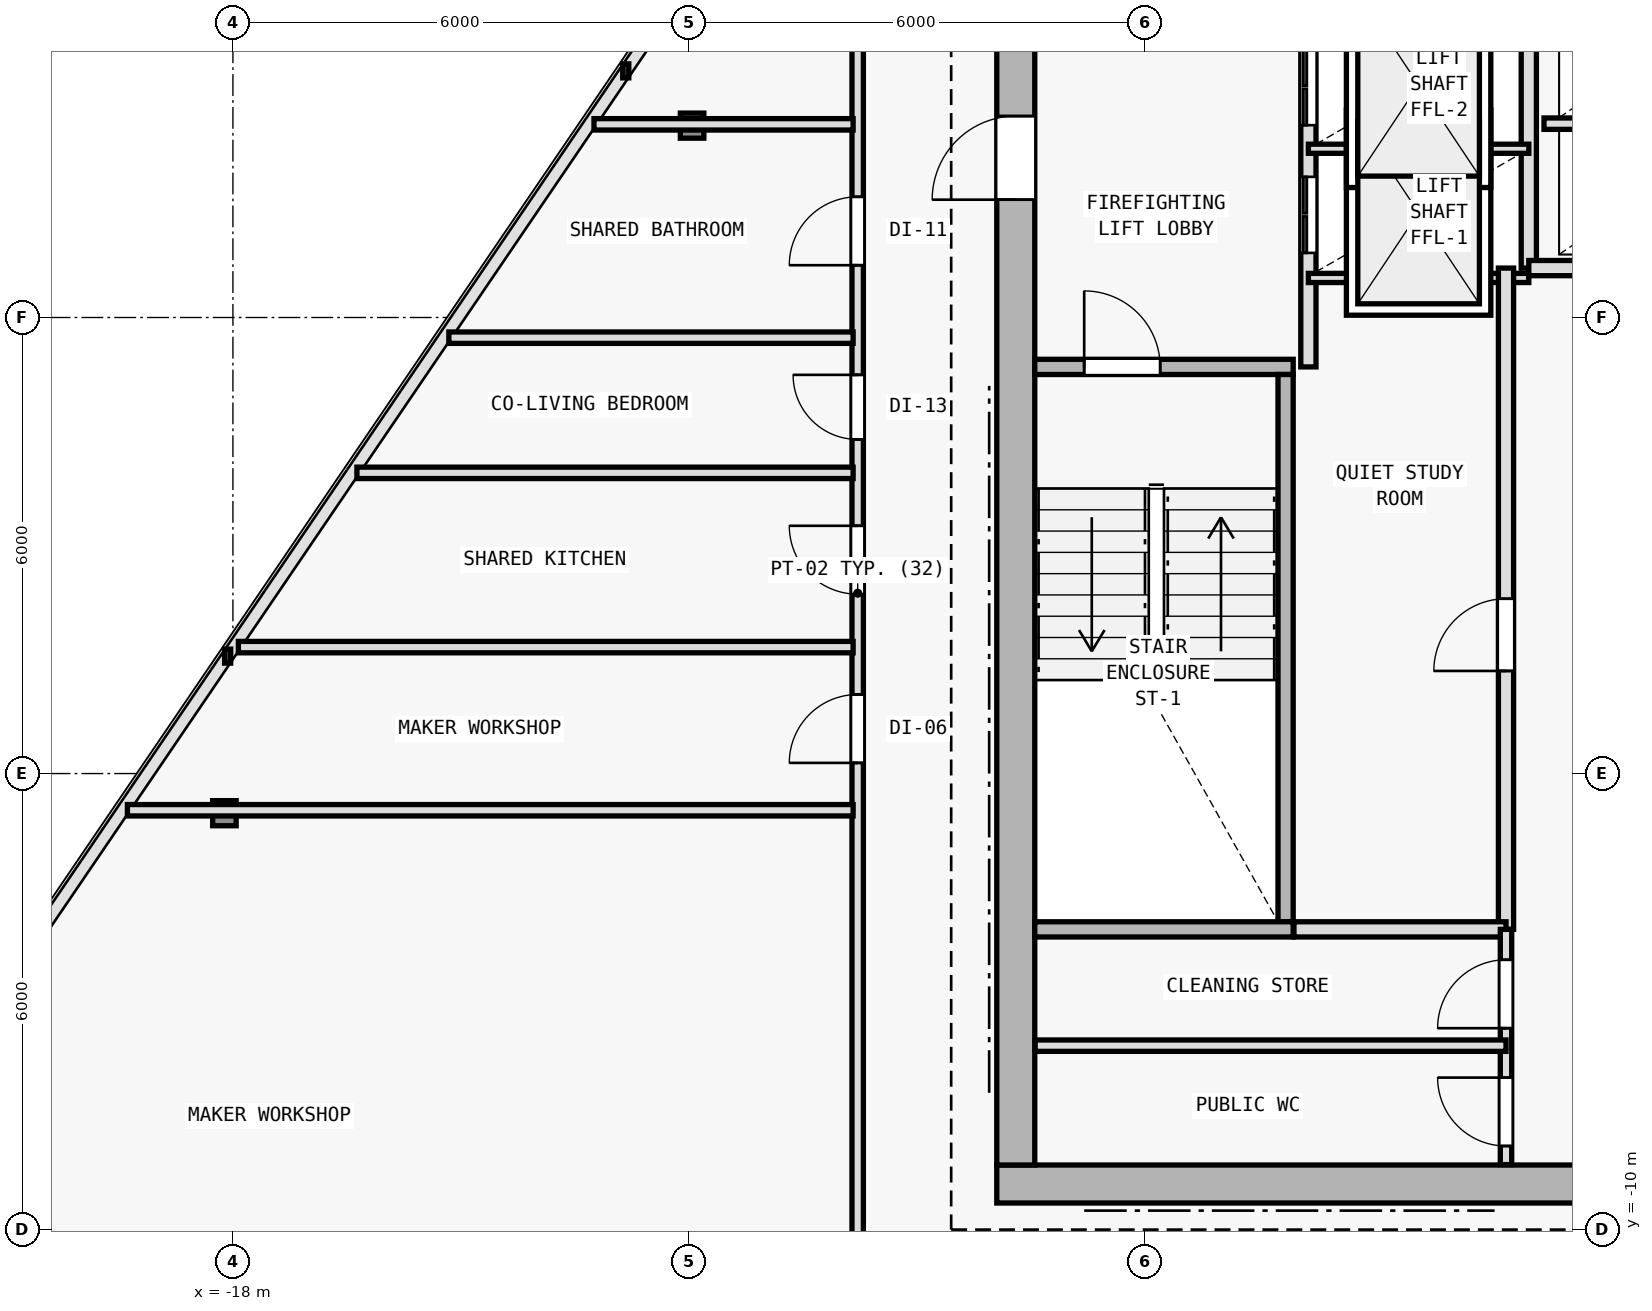
"""IFC4 building model, lengths in metres.
Left out: names, types, materials, properties, quantities, classifications, styles, units other than length and angle.
Written with IfcOpenShell. Run it as: python <this file> out.ifc"""

import sys

from ifc_helpers import new_model, si_unit, direction, frame, frame_2d, origin, origin_2d, place, context, subcontext, project, spatial, rectangle, i_section, extrude, element, fill, save


model = new_model("IFC4")
c1 = context("Model", 3, precision=1e-05, world=origin(), true_north=direction((0.0, 1.0)))
c2 = subcontext(c1, "Body", "Model", "MODEL_VIEW")
j1 = project(units=[si_unit("LENGTHUNIT", "METRE"), si_unit("PLANEANGLEUNIT", "RADIAN")], contexts=[c1])
p1 = place(None, origin())
s1 = spatial("IfcSite", under=j1, at=p1, CompositionType="ELEMENT")
p2 = place(p1, origin())
s2 = spatial("IfcBuilding", under=s1, at=p2, CompositionType="ELEMENT")
p3 = place(p2, frame((0.0, 0.0, 283.2)))
s3 = spatial("IfcBuildingStorey", under=s2, at=p3, CompositionType="ELEMENT", Elevation=283.2)
for number, where, z_axis, x_axis in (
    (1, (-7.7, -9.4, 0.0), (0.0, 0.0, 1.0), (1.0, 0.0, 0.0)),
    (2, (-7.7, 2.0, 0.0), (0.0, 0.0, 1.0), (1.0, 0.0, 0.0)),
):
    element("IfcColumn", number, at=place(p3, frame(where, z_axis=z_axis, x_axis=x_axis)), inside=s3, PredefinedType="COLUMN", context=c2, shape_type="SweptSolid", body=[
        extrude(i_section(OverallWidth=0.374, OverallDepth=0.372, WebThickness=0.012, FlangeThickness=0.02, FilletRadius=0.015, at=origin_2d()), origin(), (0.0, 0.0, 1.0), 3.6),
    ])
p4 = place(p3, frame((-11.958, 4.524, 0.006), z_axis=(0.017003561856, 0.009590008887, 0.99980943715), x_axis=(-0.491253415567, 0.871016694268, 0.0)))
e3 = element("IfcColumn", 3, at=p4, inside=s3, PredefinedType="COLUMN", context=c2, shape_type="SweptSolid", body=[
    extrude(i_section(OverallWidth=0.309, OverallDepth=0.33, WebThickness=0.011, FlangeThickness=0.019, FilletRadius=0.027, at=origin_2d()), origin(), (0.0, 0.0, 1.0), 3.59),
])
p5 = place(p3, frame((-18.112, -4.521, 0.006), z_axis=(0.025292146924, 0.021552716599, 0.999447741361), x_axis=(-0.648598186856, 0.761130995301, 0.0)))
e4 = element("IfcColumn", 4, at=p5, inside=s3, PredefinedType="COLUMN", context=c2, shape_type="SweptSolid", body=[
    extrude(i_section(OverallWidth=0.309, OverallDepth=0.33, WebThickness=0.011, FlangeThickness=0.019, FilletRadius=0.027, at=origin_2d()), origin(), (0.0, 0.0, 1.0), 3.591),
])
p6 = place(p3, frame((-7.95, -9.4, 0.0), z_axis=(0.0, 0.0, 1.0), x_axis=(1.0, 0.0, 0.0)))
e5 = element("IfcWall", 5, at=p6, inside=s3, PredefinedType="SHEAR", context=c2, shape_type="SweptSolid", body=[
    extrude(rectangle(XDim=15.9, YDim=0.5, at=frame_2d((7.95, 0.0))), origin(), (0.0, 0.0, 1.0), 3.35),
])
p7 = place(p6, frame((9.6, 0.0, 0.0)))
e6 = element("IfcOpeningElement", 6, at=p7, cuts=e5, PredefinedType="OPENING", context=c2, shape_type="SweptSolid", body=[
    extrude(rectangle(XDim=1.5, YDim=2.2, at=frame_2d((0.75, 1.1))), frame((0.0, 0.26, 0.0), z_axis=(0.0, -1.0, 0.0), x_axis=(1.0, 0.0, 0.0)), (0.0, 0.0, 1.0), 0.52),
])
p8 = place(p3, frame((-7.7, -9.15, 0.0), z_axis=(0.0, 0.0, 1.0), x_axis=(0.0, 1.0, 0.0)))
e7 = element("IfcWall", 7, at=p8, inside=s3, PredefinedType="SHEAR", context=c2, shape_type="SweptSolid", body=[
    extrude(rectangle(XDim=19.1, YDim=0.5, at=frame_2d((9.55, 0.0))), origin(), (0.0, 0.0, 1.0), 3.35),
])
p9 = place(p8, frame((12.7, 0.0, 0.0)))
e8 = element("IfcOpeningElement", 8, at=p9, cuts=e7, PredefinedType="OPENING", context=c2, shape_type="SweptSolid", body=[
    extrude(rectangle(XDim=1.1, YDim=2.15, at=frame_2d((0.55, 1.075))), frame((0.0, 0.26, 0.0), z_axis=(0.0, -1.0, 0.0), x_axis=(1.0, 0.0, 0.0)), (0.0, 0.0, 1.0), 0.52),
])
p10 = place(p3, frame((-7.45, 1.35, 0.0), z_axis=(0.0, 0.0, 1.0), x_axis=(1.0, 0.0, 0.0)))
e9 = element("IfcWall", 9, at=p10, inside=s3, PredefinedType="SOLIDWALL", context=c2, shape_type="SweptSolid", body=[
    extrude(rectangle(XDim=3.4, YDim=0.2, at=frame_2d((1.7, 0.0))), origin(), (0.0, 0.0, 1.0), 3.35),
])
p11 = place(p10, frame((0.65, 0.0, 0.0)))
e10 = element("IfcOpeningElement", 10, at=p11, cuts=e9, PredefinedType="OPENING", context=c2, shape_type="SweptSolid", body=[
    extrude(rectangle(XDim=1.0, YDim=2.15, at=frame_2d((0.5, 1.075))), frame((0.0, 0.11, 0.0), z_axis=(0.0, -1.0, 0.0), x_axis=(1.0, 0.0, 0.0)), (0.0, 0.0, 1.0), 0.22),
])
p12 = place(p3, frame((-4.15, -5.95, 0.0), z_axis=(0.0, 0.0, 1.0), x_axis=(0.0, 1.0, 0.0)))
e11 = element("IfcWall", 11, at=p12, inside=s3, PredefinedType="SOLIDWALL", context=c2, shape_type="SweptSolid", body=[
    extrude(rectangle(XDim=7.2, YDim=0.2, at=frame_2d((3.6, 0.0))), origin(), (0.0, 0.0, 1.0), 3.35),
])
p13 = place(p3, frame((-3.85, 1.35, 0.0), z_axis=(0.0, 0.0, 1.0), x_axis=(0.0, 1.0, 0.0)))
e12 = element("IfcWall", 12, at=p13, inside=s3, PredefinedType="SOLIDWALL", context=c2, shape_type="SweptSolid", body=[
    extrude(rectangle(XDim=8.595, YDim=0.2, at=frame_2d((4.297, 0.0))), origin(), (0.0, 0.0, 1.0), 3.35),
])
p14 = place(p13, frame((1.5, 0.0, 0.0)))
e13 = element("IfcOpeningElement", 13, at=p14, cuts=e12, PredefinedType="OPENING", context=c2, shape_type="SweptSolid", body=[
    extrude(rectangle(XDim=1.0, YDim=2.15, at=frame_2d((0.5, 1.075))), frame((0.0, 0.11, 0.0), z_axis=(0.0, -1.0, 0.0), x_axis=(1.0, 0.0, 0.0)), (0.0, 0.0, 1.0), 0.22),
])
p15 = place(p13, frame((3.18, 0.0, 0.0)))
e14 = element("IfcOpeningElement", 14, at=p15, cuts=e12, PredefinedType="OPENING", context=c2, shape_type="SweptSolid", body=[
    extrude(rectangle(XDim=1.0, YDim=2.15, at=frame_2d((0.5, 1.075))), frame((0.0, 0.11, 0.0), z_axis=(0.0, -1.0, 0.0), x_axis=(1.0, 0.0, 0.0)), (0.0, 0.0, 1.0), 0.22),
])
p16 = place(p3, frame((-0.95, 2.65, 0.0), z_axis=(0.0, 0.0, 1.0), x_axis=(0.0, 1.0, 0.0)))
e15 = element("IfcWall", 15, at=p16, inside=s3, PredefinedType="SOLIDWALL", context=c2, shape_type="SweptSolid", body=[
    extrude(rectangle(XDim=3.27, YDim=0.2, at=frame_2d((1.635, 0.0))), origin(), (0.0, 0.0, 1.0), 3.35),
])
for number, where, z_axis, x_axis in (
    (16, (-3.85, 2.52, 0.0), (0.0, 0.0, 1.0), (1.0, 0.0, 0.0)),
    (17, (-3.85, 4.22, 0.0), (0.0, 0.0, 1.0), (1.0, 0.0, 0.0)),
):
    element("IfcWall", number, at=place(p3, frame(where, z_axis=z_axis, x_axis=x_axis)), inside=s3, PredefinedType="PARTITIONING", context=c2, shape_type="SweptSolid", body=[
        extrude(rectangle(XDim=2.9, YDim=0.12, at=frame_2d((1.45, 0.0))), origin(), (0.0, 0.0, 1.0), 3.35),
    ])
p17 = place(p3, frame((-1.25, -6.05, 0.0), z_axis=(0.0, 0.0, 1.0), x_axis=(0.0, 1.0, 0.0)))
e18 = element("IfcWall", 18, at=p17, inside=s3, PredefinedType="SOLIDWALL", context=c2, shape_type="SweptSolid", body=[
    extrude(rectangle(XDim=8.7, YDim=0.2, at=frame_2d((4.35, 0.0))), origin(), (0.0, 0.0, 1.0), 3.35),
])
p18 = place(p17, frame((3.4, 0.0, 0.0)))
e19 = element("IfcOpeningElement", 19, at=p18, cuts=e18, PredefinedType="OPENING", context=c2, shape_type="SweptSolid", body=[
    extrude(rectangle(XDim=0.95, YDim=2.1, at=frame_2d((0.475, 1.05))), frame((0.0, 0.11, 0.0), z_axis=(0.0, -1.0, 0.0), x_axis=(1.0, 0.0, 0.0)), (0.0, 0.0, 1.0), 0.22),
])
p19 = place(p3, frame((-0.95, 2.65, 0.0), z_axis=(0.0, 0.0, 1.0), x_axis=(1.0, 0.0, 0.0)))
e20 = element("IfcWall", 20, at=p19, inside=s3, PredefinedType="SOLIDWALL", context=c2, shape_type="SweptSolid", body=[
    extrude(rectangle(XDim=2.9, YDim=0.2, at=frame_2d((1.45, 0.0))), origin(), (0.0, 0.0, 1.0), 3.35),
])
p20 = place(p3, frame((-0.75, 4.55, 0.0), z_axis=(0.0, 0.0, 1.0), x_axis=(1.0, 0.0, 0.0)))
e21 = element("IfcWall", 21, at=p20, inside=s3, PredefinedType="PARTITIONING", context=c2, shape_type="SweptSolid", body=[
    extrude(rectangle(XDim=2.7, YDim=0.15, at=frame_2d((1.35, 0.0))), origin(), (0.0, 0.0, 1.0), 3.35),
])
p21 = place(p3, frame((-7.45, -6.05, 0.0), z_axis=(0.0, 0.0, 1.0), x_axis=(1.0, 0.0, 0.0)))
e22 = element("IfcWall", 22, at=p21, inside=s3, PredefinedType="SOLIDWALL", context=c2, shape_type="SweptSolid", body=[
    extrude(rectangle(XDim=3.4, YDim=0.2, at=frame_2d((1.7, 0.0))), origin(), (0.0, 0.0, 1.0), 3.35),
])
p22 = place(p3, frame((-4.04, -6.05, 0.0), z_axis=(0.0, 0.0, 1.0), x_axis=(1.0, 0.0, 0.0)))
e23 = element("IfcWall", 23, at=p22, inside=s3, PredefinedType="SOLIDWALL", context=c2, shape_type="SweptSolid", body=[
    extrude(rectangle(XDim=2.79, YDim=0.2, at=frame_2d((1.395, 0.0))), origin(), (0.0, 0.0, 1.0), 3.35),
])
p23 = place(p3, frame((-1.25, -9.145, 0.0), z_axis=(0.0, 0.0, 1.0), x_axis=(0.0, 1.0, 0.0)))
e24 = element("IfcWall", 24, at=p23, inside=s3, PredefinedType="PARTITIONING", context=c2, shape_type="SweptSolid", body=[
    extrude(rectangle(XDim=3.095, YDim=0.15, at=frame_2d((1.547, 0.0))), origin(), (0.0, 0.0, 1.0), 3.35),
])
p24 = place(p23, frame((1.795, 0.0, 0.0)))
e25 = element("IfcOpeningElement", 25, at=p24, cuts=e24, PredefinedType="OPENING", context=c2, shape_type="SweptSolid", body=[
    extrude(rectangle(XDim=0.9, YDim=2.1, at=frame_2d((0.45, 1.05))), frame((0.0, 0.085, 0.0), z_axis=(0.0, -1.0, 0.0), x_axis=(1.0, 0.0, 0.0)), (0.0, 0.0, 1.0), 0.17),
])
p25 = place(p23, frame((0.245, 0.0, 0.0)))
e26 = element("IfcOpeningElement", 26, at=p25, cuts=e24, PredefinedType="OPENING", context=c2, shape_type="SweptSolid", body=[
    extrude(rectangle(XDim=0.9, YDim=2.1, at=frame_2d((0.45, 1.05))), frame((0.0, 0.085, 0.0), z_axis=(0.0, -1.0, 0.0), x_axis=(1.0, 0.0, 0.0)), (0.0, 0.0, 1.0), 0.17),
])
p26 = place(p3, frame((-7.445, -7.58, 0.0), z_axis=(0.0, 0.0, 1.0), x_axis=(1.0, 0.0, 0.0)))
e27 = element("IfcWall", 27, at=p26, inside=s3, PredefinedType="PARTITIONING", context=c2, shape_type="SweptSolid", body=[
    extrude(rectangle(XDim=6.195, YDim=0.15, at=frame_2d((3.098, 0.0))), origin(), (0.0, 0.0, 1.0), 3.35),
])
p27 = place(p3, frame((-9.78, -11.48, 0.0), z_axis=(0.0, 0.0, 1.0), x_axis=(0.0, 1.0, 0.0)))
e28 = element("IfcWall", 28, at=p27, inside=s3, PredefinedType="PARTITIONING", context=c2, shape_type="SweptSolid", body=[
    extrude(rectangle(XDim=19.706, YDim=0.15, at=frame_2d((9.853, 0.0))), origin(), (0.0, 0.0, 1.0), 2.875),
])
p28 = place(p27, frame((9.84, 0.0, 0.0)))
e29 = element("IfcOpeningElement", 29, at=p28, cuts=e28, PredefinedType="OPENING", context=c2, shape_type="SweptSolid", body=[
    extrude(rectangle(XDim=0.9, YDim=2.1, at=frame_2d((0.45, 1.05))), frame((0.0, 0.085, 0.0), z_axis=(0.0, -1.0, 0.0), x_axis=(1.0, 0.0, 0.0)), (0.0, 0.0, 1.0), 0.17),
])
p29 = place(p27, frame((7.62, 0.0, 0.0)))
e30 = element("IfcOpeningElement", 30, at=p29, cuts=e28, PredefinedType="OPENING", context=c2, shape_type="SweptSolid", body=[
    extrude(rectangle(XDim=0.9, YDim=2.1, at=frame_2d((0.45, 1.05))), frame((0.0, 0.085, 0.0), z_axis=(0.0, -1.0, 0.0), x_axis=(1.0, 0.0, 0.0)), (0.0, 0.0, 1.0), 0.17),
])
p30 = place(p27, frame((14.168, 0.0, 0.0)))
e31 = element("IfcOpeningElement", 31, at=p30, cuts=e28, PredefinedType="OPENING", context=c2, shape_type="SweptSolid", body=[
    extrude(rectangle(XDim=0.9, YDim=2.1, at=frame_2d((0.45, 1.05))), frame((0.0, 0.085, 0.0), z_axis=(0.0, -1.0, 0.0), x_axis=(1.0, 0.0, 0.0)), (0.0, 0.0, 1.0), 0.17),
])
p31 = place(p27, frame((11.875, 0.0, 0.0)))
e32 = element("IfcOpeningElement", 32, at=p31, cuts=e28, PredefinedType="OPENING", context=c2, shape_type="SweptSolid", body=[
    extrude(rectangle(XDim=0.85, YDim=2.1, at=frame_2d((0.425, 1.05))), frame((0.0, 0.085, 0.0), z_axis=(0.0, -1.0, 0.0), x_axis=(1.0, 0.0, 0.0)), (0.0, 0.0, 1.0), 0.17),
])
p32 = place(p3, frame((-9.84, 4.541, 0.0), z_axis=(0.0, 0.0, 1.0), x_axis=(-1.0, 0.0, 0.0)))
e33 = element("IfcWall", 33, at=p32, inside=s3, PredefinedType="PARTITIONING", context=c2, shape_type="SweptSolid", body=[
    extrude(rectangle(XDim=3.409, YDim=0.15, at=frame_2d((1.705, 0.0))), origin(), (0.0, 0.0, 1.0), 3.015),
])
p33 = place(p3, frame((-9.84, -4.483, 0.0), z_axis=(0.0, 0.0, 1.0), x_axis=(-1.0, 0.0, 0.0)))
e34 = element("IfcWall", 34, at=p33, inside=s3, PredefinedType="PARTITIONING", context=c2, shape_type="SweptSolid", body=[
    extrude(rectangle(XDim=9.548, YDim=0.15, at=frame_2d((4.774, 0.0))), origin(), (0.0, 0.0, 1.0), 2.875),
])
p34 = place(p3, frame((-9.84, -0.044, 0.0), z_axis=(0.0, 0.0, 1.0), x_axis=(-1.0, 0.0, 0.0)))
e35 = element("IfcWall", 35, at=p34, inside=s3, PredefinedType="PARTITIONING", context=c2, shape_type="SweptSolid", body=[
    extrude(rectangle(XDim=6.529, YDim=0.15, at=frame_2d((3.264, 0.0))), origin(), (0.0, 0.0, 1.0), 2.925),
])
p35 = place(p3, frame((-9.84, -2.336, 0.0), z_axis=(0.0, 0.0, 1.0), x_axis=(-1.0, 0.0, 0.0)))
e36 = element("IfcWall", 36, at=p35, inside=s3, PredefinedType="PARTITIONING", context=c2, shape_type="SweptSolid", body=[
    extrude(rectangle(XDim=8.088, YDim=0.15, at=frame_2d((4.044, 0.0))), origin(), (0.0, 0.0, 1.0), 2.925),
])
p36 = place(p3, frame((-9.84, 1.735, 0.0), z_axis=(0.0, 0.0, 1.0), x_axis=(-1.0, 0.0, 0.0)))
e37 = element("IfcWall", 37, at=p36, inside=s3, PredefinedType="PARTITIONING", context=c2, shape_type="SweptSolid", body=[
    extrude(rectangle(XDim=5.319, YDim=0.15, at=frame_2d((2.659, 0.0))), origin(), (0.0, 0.0, 1.0), 2.925),
])
p37 = place(p9, origin())
e38 = element("IfcDoor", 38, at=p37, inside=s3, OperationType="SINGLE_SWING_LEFT", PredefinedType="DOOR", context=c2, shape_type="SweptSolid", body=[
    extrude(rectangle(XDim=1.1, YDim=2.15, at=frame_2d((0.55, 1.075))), frame((0.0, 0.025, 0.0), z_axis=(0.0, -1.0, 0.0), x_axis=(1.0, 0.0, 0.0)), (0.0, 0.0, 1.0), 0.05),
])
fill(e8, e38)
p38 = place(p11, origin())
e39 = element("IfcDoor", 39, at=p38, inside=s3, OperationType="SINGLE_SWING_LEFT", PredefinedType="DOOR", context=c2, shape_type="SweptSolid", body=[
    extrude(rectangle(XDim=1.0, YDim=2.15, at=frame_2d((0.5, 1.075))), frame((0.0, 0.025, 0.0), z_axis=(0.0, -1.0, 0.0), x_axis=(1.0, 0.0, 0.0)), (0.0, 0.0, 1.0), 0.05),
])
fill(e10, e39)
p39 = place(p18, origin())
e40 = element("IfcDoor", 40, at=p39, inside=s3, OperationType="SINGLE_SWING_LEFT", PredefinedType="DOOR", context=c2, shape_type="SweptSolid", body=[
    extrude(rectangle(XDim=0.95, YDim=2.1, at=frame_2d((0.475, 1.05))), frame((0.0, 0.025, 0.0), z_axis=(0.0, -1.0, 0.0), x_axis=(1.0, 0.0, 0.0)), (0.0, 0.0, 1.0), 0.05),
])
fill(e19, e40)
p40 = place(p14, origin())
e41 = element("IfcDoor", 41, at=p40, inside=s3, OperationType="DOUBLE_DOOR_SLIDING", PredefinedType="DOOR", context=c2, shape_type="SweptSolid", body=[
    extrude(rectangle(XDim=1.0, YDim=2.15, at=frame_2d((0.5, 1.075))), frame((0.0, 0.025, 0.0), z_axis=(0.0, -1.0, 0.0), x_axis=(1.0, 0.0, 0.0)), (0.0, 0.0, 1.0), 0.05),
])
fill(e13, e41)
p41 = place(p15, origin())
e42 = element("IfcDoor", 42, at=p41, inside=s3, OperationType="DOUBLE_DOOR_SLIDING", PredefinedType="DOOR", context=c2, shape_type="SweptSolid", body=[
    extrude(rectangle(XDim=1.0, YDim=2.15, at=frame_2d((0.5, 1.075))), frame((0.0, 0.025, 0.0), z_axis=(0.0, -1.0, 0.0), x_axis=(1.0, 0.0, 0.0)), (0.0, 0.0, 1.0), 0.05),
])
fill(e14, e42)
p42 = place(p24, origin())
e43 = element("IfcDoor", 43, at=p42, inside=s3, OperationType="SINGLE_SWING_LEFT", PredefinedType="DOOR", context=c2, shape_type="SweptSolid", body=[
    extrude(rectangle(XDim=0.9, YDim=2.1, at=frame_2d((0.45, 1.05))), frame((0.0, 0.025, 0.0), z_axis=(0.0, -1.0, 0.0), x_axis=(1.0, 0.0, 0.0)), (0.0, 0.0, 1.0), 0.05),
])
fill(e25, e43)
p43 = place(p25, origin())
e44 = element("IfcDoor", 44, at=p43, inside=s3, OperationType="SINGLE_SWING_RIGHT", PredefinedType="DOOR", context=c2, shape_type="SweptSolid", body=[
    extrude(rectangle(XDim=0.9, YDim=2.1, at=frame_2d((0.45, 1.05))), frame((0.0, 0.025, 0.0), z_axis=(0.0, -1.0, 0.0), x_axis=(1.0, 0.0, 0.0)), (0.0, 0.0, 1.0), 0.05),
])
fill(e26, e44)
p44 = place(p28, origin())
e45 = element("IfcDoor", 45, at=p44, inside=s3, OperationType="SINGLE_SWING_RIGHT", PredefinedType="DOOR", context=c2, shape_type="SweptSolid", body=[
    extrude(rectangle(XDim=0.9, YDim=2.1, at=frame_2d((0.45, 1.05))), frame((0.0, 0.025, 0.0), z_axis=(0.0, -1.0, 0.0), x_axis=(1.0, 0.0, 0.0)), (0.0, 0.0, 1.0), 0.05),
])
fill(e29, e45)
p45 = place(p29, origin())
e46 = element("IfcDoor", 46, at=p45, inside=s3, OperationType="SINGLE_SWING_LEFT", PredefinedType="DOOR", context=c2, shape_type="SweptSolid", body=[
    extrude(rectangle(XDim=0.9, YDim=2.1, at=frame_2d((0.45, 1.05))), frame((0.0, 0.025, 0.0), z_axis=(0.0, -1.0, 0.0), x_axis=(1.0, 0.0, 0.0)), (0.0, 0.0, 1.0), 0.05),
])
fill(e30, e46)
p46 = place(p30, origin())
e47 = element("IfcDoor", 47, at=p46, inside=s3, OperationType="SINGLE_SWING_LEFT", PredefinedType="DOOR", context=c2, shape_type="SweptSolid", body=[
    extrude(rectangle(XDim=0.9, YDim=2.1, at=frame_2d((0.45, 1.05))), frame((0.0, 0.025, 0.0), z_axis=(0.0, -1.0, 0.0), x_axis=(1.0, 0.0, 0.0)), (0.0, 0.0, 1.0), 0.05),
])
fill(e31, e47)
p47 = place(p31, origin())
e48 = element("IfcDoor", 48, at=p47, inside=s3, OperationType="SINGLE_SWING_RIGHT", PredefinedType="DOOR", context=c2, shape_type="SweptSolid", body=[
    extrude(rectangle(XDim=0.85, YDim=2.1, at=frame_2d((0.425, 1.05))), frame((0.0, 0.025, 0.0), z_axis=(0.0, -1.0, 0.0), x_axis=(1.0, 0.0, 0.0)), (0.0, 0.0, 1.0), 0.05),
])
fill(e32, e48)
save(model, sys.argv[1])
